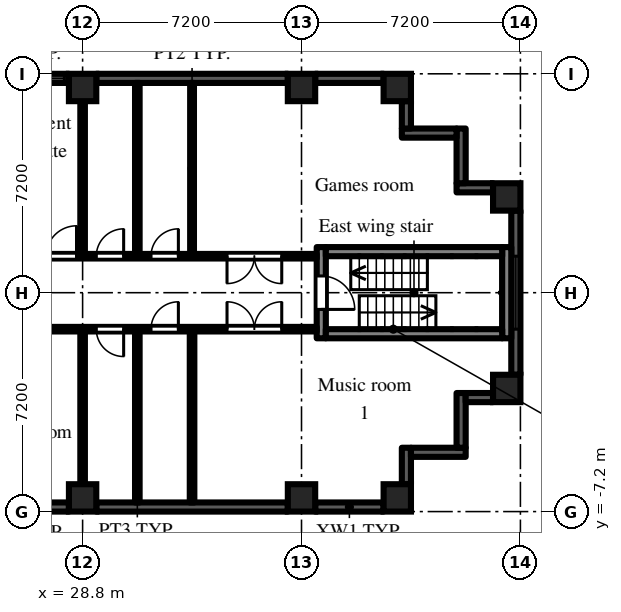
"""IFC4 building model, lengths in metres.
Left out: names, types, materials, properties, quantities, classifications, styles, units other than length and angle.
Written with IfcOpenShell. Run it as: python <this file> out.ifc"""

import sys

from ifc_helpers import new_model, si_unit, direction, frame, frame_2d, origin, origin_2d, place, context, subcontext, project, spatial, rectangle, extrude, element, fill, save


model = new_model("IFC4")
c1 = context("Model", 3, precision=1e-05, world=origin(), true_north=direction((0.0, 1.0)))
c2 = subcontext(c1, "Body", "Model", "MODEL_VIEW")
j1 = project(units=[si_unit("LENGTHUNIT", "METRE"), si_unit("PLANEANGLEUNIT", "RADIAN")], contexts=[c1])
p1 = place(None, origin())
s1 = spatial("IfcSite", under=j1, at=p1, CompositionType="ELEMENT")
p2 = place(p1, origin())
s2 = spatial("IfcBuilding", under=s1, at=p2, CompositionType="ELEMENT")
p3 = place(p2, frame((0.0, 0.0, 11.7)))
s3 = spatial("IfcBuildingStorey", under=s2, at=p3, CompositionType="ELEMENT", Elevation=11.7)
for number, where, z_axis, x_axis in (
    (1, (28.8, -6.75, 0.0), (0.0, 0.0, 1.0), (1.0, 0.0, 0.0)),
    (2, (28.8, 6.75, 0.0), (0.0, 0.0, 1.0), (1.0, 0.0, 0.0)),
    (3, (36.0, -6.75, 0.0), (0.0, 0.0, 1.0), (1.0, 0.0, 0.0)),
    (4, (36.0, 6.75, 0.0), (0.0, 0.0, 1.0), (1.0, 0.0, 0.0)),
    (5, (39.15, -6.75, 0.0), (0.0, 0.0, 1.0), (1.0, 0.0, 0.0)),
    (6, (39.15, 6.75, 0.0), (0.0, 0.0, 1.0), (1.0, 0.0, 0.0)),
    (7, (42.75, -3.15, 0.0), (0.0, 0.0, 1.0), (1.0, 0.0, 0.0)),
    (8, (42.75, 3.15, 0.0), (0.0, 0.0, 1.0), (1.0, 0.0, 0.0)),
):
    element("IfcColumn", number, at=place(p3, frame(where, z_axis=z_axis, x_axis=x_axis)), inside=s3, PredefinedType="COLUMN", context=c2, shape_type="SweptSolid", body=[
        extrude(rectangle(XDim=0.9, YDim=0.9, at=origin_2d()), origin(), (0.0, 0.0, 1.0), 3.0),
    ])
p4 = place(p3, frame((25.2, -7.05, 0.0), z_axis=(0.0, 0.0, 1.0), x_axis=(1.0, 0.0, 0.0)))
e9 = element("IfcWall", 9, at=p4, inside=s3, PredefinedType="SOLIDWALL", context=c2, shape_type="SweptSolid", body=[
    extrude(rectangle(XDim=3.15, YDim=0.3, at=frame_2d((1.575, 0.0))), origin(), (0.0, 0.0, 1.0), 2.1),
])
p5 = place(p4, frame((0.975, 0.0, 0.2)))
e10 = element("IfcOpeningElement", 10, at=p5, cuts=e9, PredefinedType="OPENING", context=c2, shape_type="SweptSolid", body=[
    extrude(rectangle(XDim=1.2, YDim=1.85, at=frame_2d((0.6, 0.925))), frame((0.0, 0.16, 0.0), z_axis=(0.0, -1.0, 0.0), x_axis=(1.0, 0.0, 0.0)), (0.0, 0.0, 1.0), 0.32),
])
p6 = place(p3, frame((29.25, -7.05, 0.0), z_axis=(0.0, 0.0, 1.0), x_axis=(1.0, 0.0, 0.0)))
e11 = element("IfcWall", 11, at=p6, inside=s3, PredefinedType="SOLIDWALL", context=c2, shape_type="SweptSolid", body=[
    extrude(rectangle(XDim=6.3, YDim=0.3, at=frame_2d((3.15, 0.0))), origin(), (0.0, 0.0, 1.0), 2.1),
])
p7 = place(p3, frame((36.45, -7.05, 0.0), z_axis=(0.0, 0.0, 1.0), x_axis=(1.0, 0.0, 0.0)))
e12 = element("IfcWall", 12, at=p7, inside=s3, PredefinedType="SOLIDWALL", context=c2, shape_type="SweptSolid", body=[
    extrude(rectangle(XDim=2.25, YDim=0.3, at=frame_2d((1.125, 0.0))), origin(), (0.0, 0.0, 1.0), 2.1),
])
p8 = place(p3, frame((39.45, -6.3, 0.0), z_axis=(0.0, 0.0, 1.0), x_axis=(0.0, 1.0, 0.0)))
e13 = element("IfcWall", 13, at=p8, inside=s3, PredefinedType="SOLIDWALL", context=c2, shape_type="SweptSolid", body=[
    extrude(rectangle(XDim=1.2, YDim=0.3, at=frame_2d((0.6, 0.0))), origin(), (0.0, 0.0, 1.0), 2.575),
])
p9 = place(p3, frame((39.6, -5.25, 0.0), z_axis=(0.0, 0.0, 1.0), x_axis=(1.0, 0.0, 0.0)))
e14 = element("IfcWall", 14, at=p9, inside=s3, PredefinedType="SOLIDWALL", context=c2, shape_type="SweptSolid", body=[
    extrude(rectangle(XDim=1.8, YDim=0.3, at=frame_2d((0.9, 0.0))), origin(), (0.0, 0.0, 1.0), 2.575),
])
p10 = place(p3, frame((41.25, -5.1, 0.0), z_axis=(0.0, 0.0, 1.0), x_axis=(0.0, 1.0, 0.0)))
e15 = element("IfcWall", 15, at=p10, inside=s3, PredefinedType="SOLIDWALL", context=c2, shape_type="SweptSolid", body=[
    extrude(rectangle(XDim=1.8, YDim=0.3, at=frame_2d((0.9, 0.0))), origin(), (0.0, 0.0, 1.0), 2.575),
])
p11 = place(p3, frame((41.4, -3.45, 0.0), z_axis=(0.0, 0.0, 1.0), x_axis=(1.0, 0.0, 0.0)))
e16 = element("IfcWall", 16, at=p11, inside=s3, PredefinedType="SOLIDWALL", context=c2, shape_type="SweptSolid", body=[
    extrude(rectangle(XDim=0.9, YDim=0.3, at=frame_2d((0.45, 0.0))), origin(), (0.0, 0.0, 1.0), 2.575),
])
p12 = place(p3, frame((43.05, -2.7, 0.0), z_axis=(0.0, 0.0, 1.0), x_axis=(0.0, 1.0, 0.0)))
e17 = element("IfcWall", 17, at=p12, inside=s3, PredefinedType="SOLIDWALL", context=c2, shape_type="SweptSolid", body=[
    extrude(rectangle(XDim=5.4, YDim=0.3, at=frame_2d((2.7, 0.0))), origin(), (0.0, 0.0, 1.0), 2.1),
])
p13 = place(p12, frame((1.5, 0.0, 0.2)))
e18 = element("IfcOpeningElement", 18, at=p13, cuts=e17, PredefinedType="OPENING", context=c2, shape_type="SweptSolid", body=[
    extrude(rectangle(XDim=2.4, YDim=1.85, at=frame_2d((1.2, 0.925))), frame((0.0, 0.16, 0.0), z_axis=(0.0, -1.0, 0.0), x_axis=(1.0, 0.0, 0.0)), (0.0, 0.0, 1.0), 0.32),
])
p14 = place(p3, frame((42.3, 3.45, 0.0), z_axis=(0.0, 0.0, 1.0), x_axis=(-1.0, 0.0, 0.0)))
e19 = element("IfcWall", 19, at=p14, inside=s3, PredefinedType="SOLIDWALL", context=c2, shape_type="SweptSolid", body=[
    extrude(rectangle(XDim=1.2, YDim=0.3, at=frame_2d((0.6, 0.0))), origin(), (0.0, 0.0, 1.0), 2.575),
])
p15 = place(p3, frame((41.25, 3.6, 0.0), z_axis=(0.0, 0.0, 1.0), x_axis=(0.0, 1.0, 0.0)))
e20 = element("IfcWall", 20, at=p15, inside=s3, PredefinedType="SOLIDWALL", context=c2, shape_type="SweptSolid", body=[
    extrude(rectangle(XDim=1.8, YDim=0.3, at=frame_2d((0.9, 0.0))), origin(), (0.0, 0.0, 1.0), 2.575),
])
p16 = place(p3, frame((41.1, 5.25, 0.0), z_axis=(0.0, 0.0, 1.0), x_axis=(-1.0, 0.0, 0.0)))
e21 = element("IfcWall", 21, at=p16, inside=s3, PredefinedType="SOLIDWALL", context=c2, shape_type="SweptSolid", body=[
    extrude(rectangle(XDim=1.8, YDim=0.3, at=frame_2d((0.9, 0.0))), origin(), (0.0, 0.0, 1.0), 2.575),
])
p17 = place(p3, frame((39.45, 5.4, 0.0), z_axis=(0.0, 0.0, 1.0), x_axis=(0.0, 1.0, 0.0)))
e22 = element("IfcWall", 22, at=p17, inside=s3, PredefinedType="SOLIDWALL", context=c2, shape_type="SweptSolid", body=[
    extrude(rectangle(XDim=0.9, YDim=0.3, at=frame_2d((0.45, 0.0))), origin(), (0.0, 0.0, 1.0), 2.575),
])
p18 = place(p3, frame((38.7, 7.05, 0.0), z_axis=(0.0, 0.0, 1.0), x_axis=(-1.0, 0.0, 0.0)))
e23 = element("IfcWall", 23, at=p18, inside=s3, PredefinedType="SOLIDWALL", context=c2, shape_type="SweptSolid", body=[
    extrude(rectangle(XDim=2.25, YDim=0.3, at=frame_2d((1.125, 0.0))), origin(), (0.0, 0.0, 1.0), 2.1),
])
p19 = place(p3, frame((35.55, 7.05, 0.0), z_axis=(0.0, 0.0, 1.0), x_axis=(-1.0, 0.0, 0.0)))
e24 = element("IfcWall", 24, at=p19, inside=s3, PredefinedType="SOLIDWALL", context=c2, shape_type="SweptSolid", body=[
    extrude(rectangle(XDim=6.3, YDim=0.3, at=frame_2d((3.15, 0.0))), origin(), (0.0, 0.0, 1.0), 2.1),
])
p20 = place(p3, frame((28.35, 7.05, 0.0), z_axis=(0.0, 0.0, 1.0), x_axis=(-1.0, 0.0, 0.0)))
e25 = element("IfcWall", 25, at=p20, inside=s3, PredefinedType="SOLIDWALL", context=c2, shape_type="SweptSolid", body=[
    extrude(rectangle(XDim=3.15, YDim=0.3, at=frame_2d((1.575, 0.0))), origin(), (0.0, 0.0, 1.0), 2.1),
])
p21 = place(p20, frame((0.15, 0.0, 0.2)))
e26 = element("IfcOpeningElement", 26, at=p21, cuts=e25, PredefinedType="OPENING", context=c2, shape_type="SweptSolid", body=[
    extrude(rectangle(XDim=2.4, YDim=1.85, at=frame_2d((1.2, 0.925))), frame((0.0, 0.16, 0.0), z_axis=(0.0, -1.0, 0.0), x_axis=(1.0, 0.0, 0.0)), (0.0, 0.0, 1.0), 0.32),
])
p22 = place(p3, frame((36.65, -1.5, 0.0), z_axis=(0.0, 0.0, 1.0), x_axis=(0.0, 1.0, 0.0)))
e27 = element("IfcWall", 27, at=p22, inside=s3, PredefinedType="SHEAR", context=c2, shape_type="SweptSolid", body=[
    extrude(rectangle(XDim=3.0, YDim=0.3, at=frame_2d((1.5, 0.0))), origin(), (0.0, 0.0, 1.0), 2.575),
])
p23 = place(p22, frame((0.95, 0.0, 0.0)))
e28 = element("IfcOpeningElement", 28, at=p23, cuts=e27, PredefinedType="OPENING", context=c2, shape_type="SweptSolid", body=[
    extrude(rectangle(XDim=1.1, YDim=2.1, at=frame_2d((0.55, 1.05))), frame((0.0, 0.16, 0.0), z_axis=(0.0, -1.0, 0.0), x_axis=(1.0, 0.0, 0.0)), (0.0, 0.0, 1.0), 0.32),
])
p24 = place(p3, frame((42.75, -1.5, 0.0), z_axis=(0.0, 0.0, 1.0), x_axis=(0.0, 1.0, 0.0)))
e29 = element("IfcWall", 29, at=p24, inside=s3, PredefinedType="SHEAR", context=c2, shape_type="SweptSolid", body=[
    extrude(rectangle(XDim=3.0, YDim=0.3, at=frame_2d((1.5, 0.0))), origin(), (0.0, 0.0, 1.0), 2.575),
])
for number, where, z_axis, x_axis in (
    (30, (36.8, -1.35, 0.0), (0.0, 0.0, 1.0), (1.0, 0.0, 0.0)),
    (31, (36.8, 1.35, 0.0), (0.0, 0.0, 1.0), (1.0, 0.0, 0.0)),
):
    element("IfcWall", number, at=place(p3, frame(where, z_axis=z_axis, x_axis=x_axis)), inside=s3, PredefinedType="SHEAR", context=c2, shape_type="SweptSolid", body=[
        extrude(rectangle(XDim=5.8, YDim=0.3, at=frame_2d((2.9, 0.0))), origin(), (0.0, 0.0, 1.0), 2.575),
    ])
p25 = place(p3, frame((21.6, -1.2, 0.0), z_axis=(0.0, 0.0, 1.0), x_axis=(1.0, 0.0, 0.0)))
e32 = element("IfcWall", 32, at=p25, inside=s3, PredefinedType="PARTITIONING", context=c2, shape_type="SweptSolid", body=[
    extrude(rectangle(XDim=14.9, YDim=0.15, at=frame_2d((7.45, 0.0))), origin(), (0.0, 0.0, 1.0), 2.575),
])
p26 = place(p25, frame((2.7, 0.0, 0.0)))
e33 = element("IfcOpeningElement", 33, at=p26, cuts=e32, PredefinedType="OPENING", context=c2, shape_type="SweptSolid", body=[
    extrude(rectangle(XDim=1.8, YDim=2.1, at=frame_2d((0.9, 1.05))), frame((0.0, 0.085, 0.0), z_axis=(0.0, -1.0, 0.0), x_axis=(1.0, 0.0, 0.0)), (0.0, 0.0, 1.0), 0.17),
])
p27 = place(p25, frame((7.65, 0.0, 0.0)))
e34 = element("IfcOpeningElement", 34, at=p27, cuts=e32, PredefinedType="OPENING", context=c2, shape_type="SweptSolid", body=[
    extrude(rectangle(XDim=0.9, YDim=2.1, at=frame_2d((0.45, 1.05))), frame((0.0, 0.085, 0.0), z_axis=(0.0, -1.0, 0.0), x_axis=(1.0, 0.0, 0.0)), (0.0, 0.0, 1.0), 0.17),
])
p28 = place(p25, frame((9.45, 0.0, 0.0)))
e35 = element("IfcOpeningElement", 35, at=p28, cuts=e32, PredefinedType="OPENING", context=c2, shape_type="SweptSolid", body=[
    extrude(rectangle(XDim=0.9, YDim=2.1, at=frame_2d((0.45, 1.05))), frame((0.0, 0.085, 0.0), z_axis=(0.0, -1.0, 0.0), x_axis=(1.0, 0.0, 0.0)), (0.0, 0.0, 1.0), 0.17),
])
p29 = place(p25, frame((11.95, 0.0, 0.0)))
e36 = element("IfcOpeningElement", 36, at=p29, cuts=e32, PredefinedType="OPENING", context=c2, shape_type="SweptSolid", body=[
    extrude(rectangle(XDim=1.8, YDim=2.1, at=frame_2d((0.9, 1.05))), frame((0.0, 0.085, 0.0), z_axis=(0.0, -1.0, 0.0), x_axis=(1.0, 0.0, 0.0)), (0.0, 0.0, 1.0), 0.17),
])
p30 = place(p3, frame((21.6, 1.2, 0.0), z_axis=(0.0, 0.0, 1.0), x_axis=(1.0, 0.0, 0.0)))
e37 = element("IfcWall", 37, at=p30, inside=s3, PredefinedType="PARTITIONING", context=c2, shape_type="SweptSolid", body=[
    extrude(rectangle(XDim=14.9, YDim=0.15, at=frame_2d((7.45, 0.0))), origin(), (0.0, 0.0, 1.0), 2.575),
])
p31 = place(p30, frame((6.0, 0.0, 0.0)))
e38 = element("IfcOpeningElement", 38, at=p31, cuts=e37, PredefinedType="OPENING", context=c2, shape_type="SweptSolid", body=[
    extrude(rectangle(XDim=1.0, YDim=2.1, at=frame_2d((0.5, 1.05))), frame((0.0, 0.085, 0.0), z_axis=(0.0, -1.0, 0.0), x_axis=(1.0, 0.0, 0.0)), (0.0, 0.0, 1.0), 0.17),
])
p32 = place(p30, frame((7.65, 0.0, 0.0)))
e39 = element("IfcOpeningElement", 39, at=p32, cuts=e37, PredefinedType="OPENING", context=c2, shape_type="SweptSolid", body=[
    extrude(rectangle(XDim=0.9, YDim=2.1, at=frame_2d((0.45, 1.05))), frame((0.0, 0.085, 0.0), z_axis=(0.0, -1.0, 0.0), x_axis=(1.0, 0.0, 0.0)), (0.0, 0.0, 1.0), 0.17),
])
p33 = place(p30, frame((9.45, 0.0, 0.0)))
e40 = element("IfcOpeningElement", 40, at=p33, cuts=e37, PredefinedType="OPENING", context=c2, shape_type="SweptSolid", body=[
    extrude(rectangle(XDim=0.9, YDim=2.1, at=frame_2d((0.45, 1.05))), frame((0.0, 0.085, 0.0), z_axis=(0.0, -1.0, 0.0), x_axis=(1.0, 0.0, 0.0)), (0.0, 0.0, 1.0), 0.17),
])
p34 = place(p30, frame((11.95, 0.0, 0.0)))
e41 = element("IfcOpeningElement", 41, at=p34, cuts=e37, PredefinedType="OPENING", context=c2, shape_type="SweptSolid", body=[
    extrude(rectangle(XDim=1.8, YDim=2.1, at=frame_2d((0.9, 1.05))), frame((0.0, 0.085, 0.0), z_axis=(0.0, -1.0, 0.0), x_axis=(1.0, 0.0, 0.0)), (0.0, 0.0, 1.0), 0.17),
])
for number, where, z_axis, x_axis in (
    (42, (28.8, -6.9, 0.0), (0.0, 0.0, 1.0), (0.0, 1.0, 0.0)),
    (43, (28.8, 1.275, 0.0), (0.0, 0.0, 1.0), (0.0, 1.0, 0.0)),
    (44, (30.6, -6.9, 0.0), (0.0, 0.0, 1.0), (0.0, 1.0, 0.0)),
    (45, (30.6, 1.275, 0.0), (0.0, 0.0, 1.0), (0.0, 1.0, 0.0)),
    (46, (32.4, -6.9, 0.0), (0.0, 0.0, 1.0), (0.0, 1.0, 0.0)),
):
    element("IfcWall", number, at=place(p3, frame(where, z_axis=z_axis, x_axis=x_axis)), inside=s3, PredefinedType="PARTITIONING", context=c2, shape_type="SweptSolid", body=[
        extrude(rectangle(XDim=5.625, YDim=0.15, at=frame_2d((2.812, 0.0))), origin(), (0.0, 0.0, 1.0), 2.575),
    ])
p35 = place(p3, frame((32.4, 1.275, 0.0), z_axis=(0.0, 0.0, 1.0), x_axis=(0.0, 1.0, 0.0)))
e47 = element("IfcWall", 47, at=p35, inside=s3, PredefinedType="PARTITIONING", context=c2, shape_type="SweptSolid", body=[
    extrude(rectangle(XDim=5.625, YDim=0.125, at=frame_2d((2.812, 0.0))), origin(), (0.0, 0.0, 1.0), 2.575),
])
p36 = place(p13, origin())
e48 = element("IfcWindow", 48, at=p36, inside=s3, PartitioningType="SINGLE_PANEL", PredefinedType="WINDOW", context=c2, shape_type="SweptSolid", body=[
    extrude(rectangle(XDim=2.4, YDim=1.85, at=frame_2d((1.2, 0.925))), frame((0.0, 0.03, 0.0), z_axis=(0.0, -1.0, 0.0), x_axis=(1.0, 0.0, 0.0)), (0.0, 0.0, 1.0), 0.06),
])
fill(e18, e48)
p37 = place(p21, origin())
e49 = element("IfcWindow", 49, at=p37, inside=s3, PartitioningType="SINGLE_PANEL", PredefinedType="WINDOW", context=c2, shape_type="SweptSolid", body=[
    extrude(rectangle(XDim=2.4, YDim=1.85, at=frame_2d((1.2, 0.925))), frame((0.0, 0.03, 0.0), z_axis=(0.0, -1.0, 0.0), x_axis=(1.0, 0.0, 0.0)), (0.0, 0.0, 1.0), 0.06),
])
fill(e26, e49)
p38 = place(p23, frame((1.1, 0.0, 0.0), z_axis=(0.0, 0.0, 1.0), x_axis=(-1.0, 0.0, 0.0)))
e50 = element("IfcDoor", 50, at=p38, inside=s3, OperationType="SINGLE_SWING_RIGHT", PredefinedType="DOOR", context=c2, shape_type="SweptSolid", body=[
    extrude(rectangle(XDim=1.1, YDim=2.1, at=frame_2d((0.55, 1.05))), frame((0.0, 0.025, 0.0), z_axis=(0.0, -1.0, 0.0), x_axis=(1.0, 0.0, 0.0)), (0.0, 0.0, 1.0), 0.05),
])
fill(e28, e50)
p39 = place(p31, origin())
e51 = element("IfcDoor", 51, at=p39, inside=s3, OperationType="SINGLE_SWING_RIGHT", PredefinedType="DOOR", context=c2, shape_type="SweptSolid", body=[
    extrude(rectangle(XDim=1.0, YDim=2.1, at=frame_2d((0.5, 1.05))), frame((0.0, 0.025, 0.0), z_axis=(0.0, -1.0, 0.0), x_axis=(1.0, 0.0, 0.0)), (0.0, 0.0, 1.0), 0.05),
])
fill(e38, e51)
p40 = place(p32, origin())
e52 = element("IfcDoor", 52, at=p40, inside=s3, OperationType="SINGLE_SWING_RIGHT", PredefinedType="DOOR", context=c2, shape_type="SweptSolid", body=[
    extrude(rectangle(XDim=0.9, YDim=2.1, at=frame_2d((0.45, 1.05))), frame((0.0, 0.025, 0.0), z_axis=(0.0, -1.0, 0.0), x_axis=(1.0, 0.0, 0.0)), (0.0, 0.0, 1.0), 0.05),
])
fill(e39, e52)
p41 = place(p33, origin())
e53 = element("IfcDoor", 53, at=p41, inside=s3, OperationType="SINGLE_SWING_RIGHT", PredefinedType="DOOR", context=c2, shape_type="SweptSolid", body=[
    extrude(rectangle(XDim=0.9, YDim=2.1, at=frame_2d((0.45, 1.05))), frame((0.0, 0.025, 0.0), z_axis=(0.0, -1.0, 0.0), x_axis=(1.0, 0.0, 0.0)), (0.0, 0.0, 1.0), 0.05),
])
fill(e40, e53)
p42 = place(p34, frame((1.8, 0.0, 0.0), z_axis=(0.0, 0.0, 1.0), x_axis=(-1.0, 0.0, 0.0)))
e54 = element("IfcDoor", 54, at=p42, inside=s3, OperationType="DOUBLE_DOOR_DOUBLE_SWING", PredefinedType="DOOR", context=c2, shape_type="SweptSolid", body=[
    extrude(rectangle(XDim=1.8, YDim=2.1, at=frame_2d((0.9, 1.05))), frame((0.0, 0.025, 0.0), z_axis=(0.0, -1.0, 0.0), x_axis=(1.0, 0.0, 0.0)), (0.0, 0.0, 1.0), 0.05),
])
fill(e41, e54)
p43 = place(p27, frame((0.9, 0.0, 0.0), z_axis=(0.0, 0.0, 1.0), x_axis=(-1.0, 0.0, 0.0)))
e55 = element("IfcDoor", 55, at=p43, inside=s3, OperationType="SINGLE_SWING_LEFT", PredefinedType="DOOR", context=c2, shape_type="SweptSolid", body=[
    extrude(rectangle(XDim=0.9, YDim=2.1, at=frame_2d((0.45, 1.05))), frame((0.0, 0.025, 0.0), z_axis=(0.0, -1.0, 0.0), x_axis=(1.0, 0.0, 0.0)), (0.0, 0.0, 1.0), 0.05),
])
fill(e34, e55)
p44 = place(p28, origin())
e56 = element("IfcDoor", 56, at=p44, inside=s3, OperationType="SINGLE_SWING_RIGHT", PredefinedType="DOOR", context=c2, shape_type="SweptSolid", body=[
    extrude(rectangle(XDim=0.9, YDim=2.1, at=frame_2d((0.45, 1.05))), frame((0.0, 0.025, 0.0), z_axis=(0.0, -1.0, 0.0), x_axis=(1.0, 0.0, 0.0)), (0.0, 0.0, 1.0), 0.05),
])
fill(e35, e56)
p45 = place(p29, origin())
e57 = element("IfcDoor", 57, at=p45, inside=s3, OperationType="DOUBLE_DOOR_DOUBLE_SWING", PredefinedType="DOOR", context=c2, shape_type="SweptSolid", body=[
    extrude(rectangle(XDim=1.8, YDim=2.1, at=frame_2d((0.9, 1.05))), frame((0.0, 0.025, 0.0), z_axis=(0.0, -1.0, 0.0), x_axis=(1.0, 0.0, 0.0)), (0.0, 0.0, 1.0), 0.05),
])
fill(e36, e57)
save(model, sys.argv[1])
